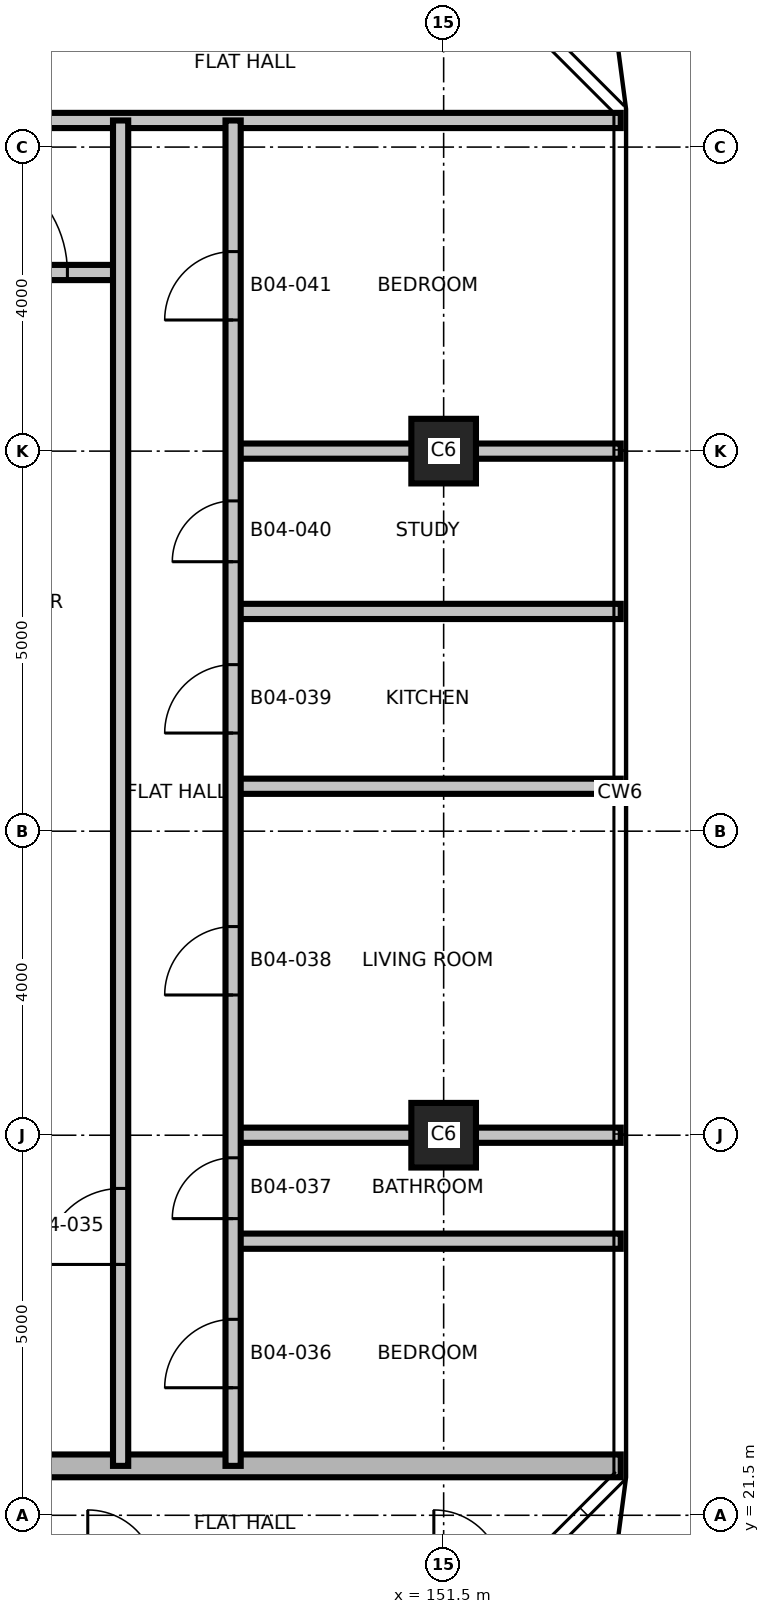
"""IFC4 building model, lengths in metres.
Left out: names, types, materials, properties, quantities, classifications, styles, units other than length and angle.
Written with IfcOpenShell. Run it as: python <this file> out.ifc"""

import sys

from ifc_helpers import new_model, si_unit, direction, frame, frame_2d, origin, origin_2d, place, context, subcontext, project, spatial, rectangle, extrude, element, fill, save


model = new_model("IFC4")
c1 = context("Model", 3, precision=1e-05, world=origin(), true_north=direction((0.0, 1.0)))
c2 = subcontext(c1, "Body", "Model", "MODEL_VIEW")
j1 = project(units=[si_unit("LENGTHUNIT", "METRE"), si_unit("PLANEANGLEUNIT", "RADIAN")], contexts=[c1])
p1 = place(None, origin())
s1 = spatial("IfcSite", under=j1, at=p1, CompositionType="ELEMENT")
p2 = place(p1, origin())
s2 = spatial("IfcBuilding", under=s1, at=p2, CompositionType="ELEMENT")
p3 = place(p2, frame((0.0, 0.0, 66.8)))
s3 = spatial("IfcBuildingStorey", under=s2, at=p3, CompositionType="ELEMENT", Elevation=66.8)
for number, where, z_axis, x_axis in (
    (1, (151.5, 26.5, 0.0), (0.0, 0.0, 1.0), (1.0, 0.0, 0.0)),
    (2, (151.5, 35.5, 0.0), (0.0, 0.0, 1.0), (1.0, 0.0, 0.0)),
):
    element("IfcColumn", number, at=place(p3, frame(where, z_axis=z_axis, x_axis=x_axis)), inside=s3, PredefinedType="COLUMN", context=c2, shape_type="SweptSolid", body=[
        extrude(rectangle(XDim=0.85, YDim=0.85, at=origin_2d()), origin(), (0.0, 0.0, 1.0), 3.7),
    ])
p4 = place(p3, frame((119.17, 22.15, 0.0), z_axis=(0.0, 0.0, 1.0), x_axis=(1.0, 0.0, 0.0)))
e3 = element("IfcWall", 3, at=p4, inside=s3, PredefinedType="SHEAR", context=c2, shape_type="SweptSolid", body=[
    extrude(rectangle(XDim=34.66, YDim=0.3, at=frame_2d((17.33, 0.0))), origin(), (0.0, 0.0, 1.0), 3.4),
])
p5 = place(p4, frame((23.58, 0.0, 0.0)))
e4 = element("IfcOpeningElement", 4, at=p5, cuts=e3, PredefinedType="OPENING", context=c2, shape_type="SweptSolid", body=[
    extrude(rectangle(XDim=1.0, YDim=2.1, at=frame_2d((0.5, 1.05))), frame((0.0, 0.16, 0.0), z_axis=(0.0, -1.0, 0.0), x_axis=(1.0, 0.0, 0.0)), (0.0, 0.0, 1.0), 0.32),
])
p6 = place(p4, frame((11.93, 0.0, 0.0)))
e5 = element("IfcOpeningElement", 5, at=p6, cuts=e3, PredefinedType="OPENING", context=c2, shape_type="SweptSolid", body=[
    extrude(rectangle(XDim=1.0, YDim=2.1, at=frame_2d((0.5, 1.05))), frame((0.0, 0.16, 0.0), z_axis=(0.0, -1.0, 0.0), x_axis=(1.0, 0.0, 0.0)), (0.0, 0.0, 1.0), 0.32),
])
p7 = place(p4, frame((25.48, 0.0, 0.0)))
e6 = element("IfcOpeningElement", 6, at=p7, cuts=e3, PredefinedType="OPENING", context=c2, shape_type="SweptSolid", body=[
    extrude(rectangle(XDim=1.0, YDim=2.1, at=frame_2d((0.5, 1.05))), frame((0.0, 0.16, 0.0), z_axis=(0.0, -1.0, 0.0), x_axis=(1.0, 0.0, 0.0)), (0.0, 0.0, 1.0), 0.32),
])
p8 = place(p4, frame((17.58, 0.0, 0.0)))
e7 = element("IfcOpeningElement", 7, at=p8, cuts=e3, PredefinedType="OPENING", context=c2, shape_type="SweptSolid", body=[
    extrude(rectangle(XDim=0.9, YDim=2.1, at=frame_2d((0.45, 1.05))), frame((0.0, 0.16, 0.0), z_axis=(0.0, -1.0, 0.0), x_axis=(1.0, 0.0, 0.0)), (0.0, 0.0, 1.0), 0.32),
])
for number, where, z_axis, x_axis in (
    (8, (148.73, 25.106, 0.0), (0.0, 0.0, 1.0), (1.0, 0.0, 0.0)),
    (9, (148.73, 26.5, 0.0), (0.0, 0.0, 1.0), (1.0, 0.0, 0.0)),
    (10, (148.73, 31.091, 0.0), (0.0, 0.0, 1.0), (1.0, 0.0, 0.0)),
    (11, (148.73, 33.391, 0.0), (0.0, 0.0, 1.0), (1.0, 0.0, 0.0)),
    (12, (148.73, 35.5, 0.0), (0.0, 0.0, 1.0), (1.0, 0.0, 0.0)),
):
    element("IfcWall", number, at=place(p3, frame(where, z_axis=z_axis, x_axis=x_axis)), inside=s3, PredefinedType="PARTITIONING", context=c2, shape_type="SweptSolid", body=[
        extrude(rectangle(XDim=5.1, YDim=0.2, at=frame_2d((2.55, 0.0))), origin(), (0.0, 0.0, 1.0), 3.4),
    ])
p9 = place(p3, frame((144.02, 37.85, 0.0), z_axis=(0.0, 0.0, 1.0), x_axis=(1.0, 0.0, 0.0)))
e13 = element("IfcWall", 13, at=p9, inside=s3, PredefinedType="PARTITIONING", context=c2, shape_type="SweptSolid", body=[
    extrude(rectangle(XDim=3.23, YDim=0.2, at=frame_2d((1.615, 0.0))), origin(), (0.0, 0.0, 1.0), 3.4),
])
p10 = place(p9, frame((1.03, 0.0, 0.0)))
e14 = element("IfcOpeningElement", 14, at=p10, cuts=e13, PredefinedType="OPENING", context=c2, shape_type="SweptSolid", body=[
    extrude(rectangle(XDim=1.5, YDim=2.1, at=frame_2d((0.75, 1.05))), frame((0.0, 0.11, 0.0), z_axis=(0.0, -1.0, 0.0), x_axis=(1.0, 0.0, 0.0)), (0.0, 0.0, 1.0), 0.22),
])
p11 = place(p3, frame((119.17, 39.85, 0.0), z_axis=(0.0, 0.0, 1.0), x_axis=(1.0, 0.0, 0.0)))
e15 = element("IfcWall", 15, at=p11, inside=s3, PredefinedType="PARTITIONING", context=c2, shape_type="SweptSolid", body=[
    extrude(rectangle(XDim=34.66, YDim=0.2, at=frame_2d((17.33, 0.0))), origin(), (0.0, 0.0, 1.0), 3.4),
])
p12 = place(p11, frame((11.93, 0.0, 0.0)))
e16 = element("IfcOpeningElement", 16, at=p12, cuts=e15, PredefinedType="OPENING", context=c2, shape_type="SweptSolid", body=[
    extrude(rectangle(XDim=1.0, YDim=2.1, at=frame_2d((0.5, 1.05))), frame((0.0, 0.11, 0.0), z_axis=(0.0, -1.0, 0.0), x_axis=(1.0, 0.0, 0.0)), (0.0, 0.0, 1.0), 0.22),
])
p13 = place(p11, frame((20.58, 0.0, 0.0)))
e17 = element("IfcOpeningElement", 17, at=p13, cuts=e15, PredefinedType="OPENING", context=c2, shape_type="SweptSolid", body=[
    extrude(rectangle(XDim=1.0, YDim=2.1, at=frame_2d((0.5, 1.05))), frame((0.0, 0.11, 0.0), z_axis=(0.0, -1.0, 0.0), x_axis=(1.0, 0.0, 0.0)), (0.0, 0.0, 1.0), 0.22),
])
p14 = place(p11, frame((25.48, 0.0, 0.0)))
e18 = element("IfcOpeningElement", 18, at=p14, cuts=e15, PredefinedType="OPENING", context=c2, shape_type="SweptSolid", body=[
    extrude(rectangle(XDim=1.0, YDim=2.1, at=frame_2d((0.5, 1.05))), frame((0.0, 0.11, 0.0), z_axis=(0.0, -1.0, 0.0), x_axis=(1.0, 0.0, 0.0)), (0.0, 0.0, 1.0), 0.22),
])
p15 = place(p3, frame((147.25, 22.15, 0.0), z_axis=(0.0, 0.0, 1.0), x_axis=(0.0, 1.0, 0.0)))
e19 = element("IfcWall", 19, at=p15, inside=s3, PredefinedType="PARTITIONING", context=c2, shape_type="SweptSolid", body=[
    extrude(rectangle(XDim=17.7, YDim=0.2, at=frame_2d((8.85, 0.0))), origin(), (0.0, 0.0, 1.0), 3.4),
])
p16 = place(p15, frame((2.65, 0.0, 0.0)))
e20 = element("IfcOpeningElement", 20, at=p16, cuts=e19, PredefinedType="OPENING", context=c2, shape_type="SweptSolid", body=[
    extrude(rectangle(XDim=1.0, YDim=2.1, at=frame_2d((0.5, 1.05))), frame((0.0, 0.11, 0.0), z_axis=(0.0, -1.0, 0.0), x_axis=(1.0, 0.0, 0.0)), (0.0, 0.0, 1.0), 0.22),
])
p17 = place(p3, frame((148.73, 22.15, 0.0), z_axis=(0.0, 0.0, 1.0), x_axis=(0.0, 1.0, 0.0)))
e21 = element("IfcWall", 21, at=p17, inside=s3, PredefinedType="PARTITIONING", context=c2, shape_type="SweptSolid", body=[
    extrude(rectangle(XDim=17.7, YDim=0.2, at=frame_2d((8.85, 0.0))), origin(), (0.0, 0.0, 1.0), 3.4),
])
p18 = place(p17, frame((1.028, 0.0, 0.0)))
e22 = element("IfcOpeningElement", 22, at=p18, cuts=e21, PredefinedType="OPENING", context=c2, shape_type="SweptSolid", body=[
    extrude(rectangle(XDim=0.9, YDim=2.1, at=frame_2d((0.45, 1.05))), frame((0.0, 0.11, 0.0), z_axis=(0.0, -1.0, 0.0), x_axis=(1.0, 0.0, 0.0)), (0.0, 0.0, 1.0), 0.22),
])
p19 = place(p17, frame((3.253, 0.0, 0.0)))
e23 = element("IfcOpeningElement", 23, at=p19, cuts=e21, PredefinedType="OPENING", context=c2, shape_type="SweptSolid", body=[
    extrude(rectangle(XDim=0.8, YDim=2.1, at=frame_2d((0.4, 1.05))), frame((0.0, 0.11, 0.0), z_axis=(0.0, -1.0, 0.0), x_axis=(1.0, 0.0, 0.0)), (0.0, 0.0, 1.0), 0.22),
])
p20 = place(p17, frame((6.195, 0.0, 0.0)))
e24 = element("IfcOpeningElement", 24, at=p20, cuts=e21, PredefinedType="OPENING", context=c2, shape_type="SweptSolid", body=[
    extrude(rectangle(XDim=0.9, YDim=2.1, at=frame_2d((0.45, 1.05))), frame((0.0, 0.11, 0.0), z_axis=(0.0, -1.0, 0.0), x_axis=(1.0, 0.0, 0.0)), (0.0, 0.0, 1.0), 0.22),
])
p21 = place(p17, frame((9.641, 0.0, 0.0)))
e25 = element("IfcOpeningElement", 25, at=p21, cuts=e21, PredefinedType="OPENING", context=c2, shape_type="SweptSolid", body=[
    extrude(rectangle(XDim=0.9, YDim=2.1, at=frame_2d((0.45, 1.05))), frame((0.0, 0.11, 0.0), z_axis=(0.0, -1.0, 0.0), x_axis=(1.0, 0.0, 0.0)), (0.0, 0.0, 1.0), 0.22),
])
p22 = place(p17, frame((11.895, 0.0, 0.0)))
e26 = element("IfcOpeningElement", 26, at=p22, cuts=e21, PredefinedType="OPENING", context=c2, shape_type="SweptSolid", body=[
    extrude(rectangle(XDim=0.8, YDim=2.1, at=frame_2d((0.4, 1.05))), frame((0.0, 0.11, 0.0), z_axis=(0.0, -1.0, 0.0), x_axis=(1.0, 0.0, 0.0)), (0.0, 0.0, 1.0), 0.22),
])
p23 = place(p17, frame((15.075, 0.0, 0.0)))
e27 = element("IfcOpeningElement", 27, at=p23, cuts=e21, PredefinedType="OPENING", context=c2, shape_type="SweptSolid", body=[
    extrude(rectangle(XDim=0.9, YDim=2.1, at=frame_2d((0.45, 1.05))), frame((0.0, 0.11, 0.0), z_axis=(0.0, -1.0, 0.0), x_axis=(1.0, 0.0, 0.0)), (0.0, 0.0, 1.0), 0.22),
])
p24 = place(p10, origin())
e28 = element("IfcDoor", 28, at=p24, inside=s3, OperationType="SINGLE_SWING_LEFT", PredefinedType="DOOR", context=c2, shape_type="SweptSolid", body=[
    extrude(rectangle(XDim=1.5, YDim=2.1, at=frame_2d((0.75, 1.05))), frame((0.0, 0.025, 0.0), z_axis=(0.0, -1.0, 0.0), x_axis=(1.0, 0.0, 0.0)), (0.0, 0.0, 1.0), 0.05),
])
fill(e14, e28)
p25 = place(p16, origin())
e29 = element("IfcDoor", 29, at=p25, inside=s3, OperationType="SINGLE_SWING_LEFT", PredefinedType="DOOR", context=c2, shape_type="SweptSolid", body=[
    extrude(rectangle(XDim=1.0, YDim=2.1, at=frame_2d((0.5, 1.05))), frame((0.0, 0.025, 0.0), z_axis=(0.0, -1.0, 0.0), x_axis=(1.0, 0.0, 0.0)), (0.0, 0.0, 1.0), 0.05),
])
fill(e20, e29)
p26 = place(p18, origin())
e30 = element("IfcDoor", 30, at=p26, inside=s3, OperationType="SINGLE_SWING_RIGHT", PredefinedType="DOOR", context=c2, shape_type="SweptSolid", body=[
    extrude(rectangle(XDim=0.9, YDim=2.1, at=frame_2d((0.45, 1.05))), frame((0.0, 0.025, 0.0), z_axis=(0.0, -1.0, 0.0), x_axis=(1.0, 0.0, 0.0)), (0.0, 0.0, 1.0), 0.05),
])
fill(e22, e30)
p27 = place(p19, origin())
e31 = element("IfcDoor", 31, at=p27, inside=s3, OperationType="SINGLE_SWING_LEFT", PredefinedType="DOOR", context=c2, shape_type="SweptSolid", body=[
    extrude(rectangle(XDim=0.8, YDim=2.1, at=frame_2d((0.4, 1.05))), frame((0.0, 0.025, 0.0), z_axis=(0.0, -1.0, 0.0), x_axis=(1.0, 0.0, 0.0)), (0.0, 0.0, 1.0), 0.05),
])
fill(e23, e31)
p28 = place(p20, origin())
e32 = element("IfcDoor", 32, at=p28, inside=s3, OperationType="SINGLE_SWING_RIGHT", PredefinedType="DOOR", context=c2, shape_type="SweptSolid", body=[
    extrude(rectangle(XDim=0.9, YDim=2.1, at=frame_2d((0.45, 1.05))), frame((0.0, 0.025, 0.0), z_axis=(0.0, -1.0, 0.0), x_axis=(1.0, 0.0, 0.0)), (0.0, 0.0, 1.0), 0.05),
])
fill(e24, e32)
p29 = place(p21, origin())
e33 = element("IfcDoor", 33, at=p29, inside=s3, OperationType="SINGLE_SWING_LEFT", PredefinedType="DOOR", context=c2, shape_type="SweptSolid", body=[
    extrude(rectangle(XDim=0.9, YDim=2.1, at=frame_2d((0.45, 1.05))), frame((0.0, 0.025, 0.0), z_axis=(0.0, -1.0, 0.0), x_axis=(1.0, 0.0, 0.0)), (0.0, 0.0, 1.0), 0.05),
])
fill(e25, e33)
p30 = place(p22, origin())
e34 = element("IfcDoor", 34, at=p30, inside=s3, OperationType="SINGLE_SWING_RIGHT", PredefinedType="DOOR", context=c2, shape_type="SweptSolid", body=[
    extrude(rectangle(XDim=0.8, YDim=2.1, at=frame_2d((0.4, 1.05))), frame((0.0, 0.025, 0.0), z_axis=(0.0, -1.0, 0.0), x_axis=(1.0, 0.0, 0.0)), (0.0, 0.0, 1.0), 0.05),
])
fill(e26, e34)
p31 = place(p23, origin())
e35 = element("IfcDoor", 35, at=p31, inside=s3, OperationType="SINGLE_SWING_LEFT", PredefinedType="DOOR", context=c2, shape_type="SweptSolid", body=[
    extrude(rectangle(XDim=0.9, YDim=2.1, at=frame_2d((0.45, 1.05))), frame((0.0, 0.025, 0.0), z_axis=(0.0, -1.0, 0.0), x_axis=(1.0, 0.0, 0.0)), (0.0, 0.0, 1.0), 0.05),
])
fill(e27, e35)
save(model, sys.argv[1])
